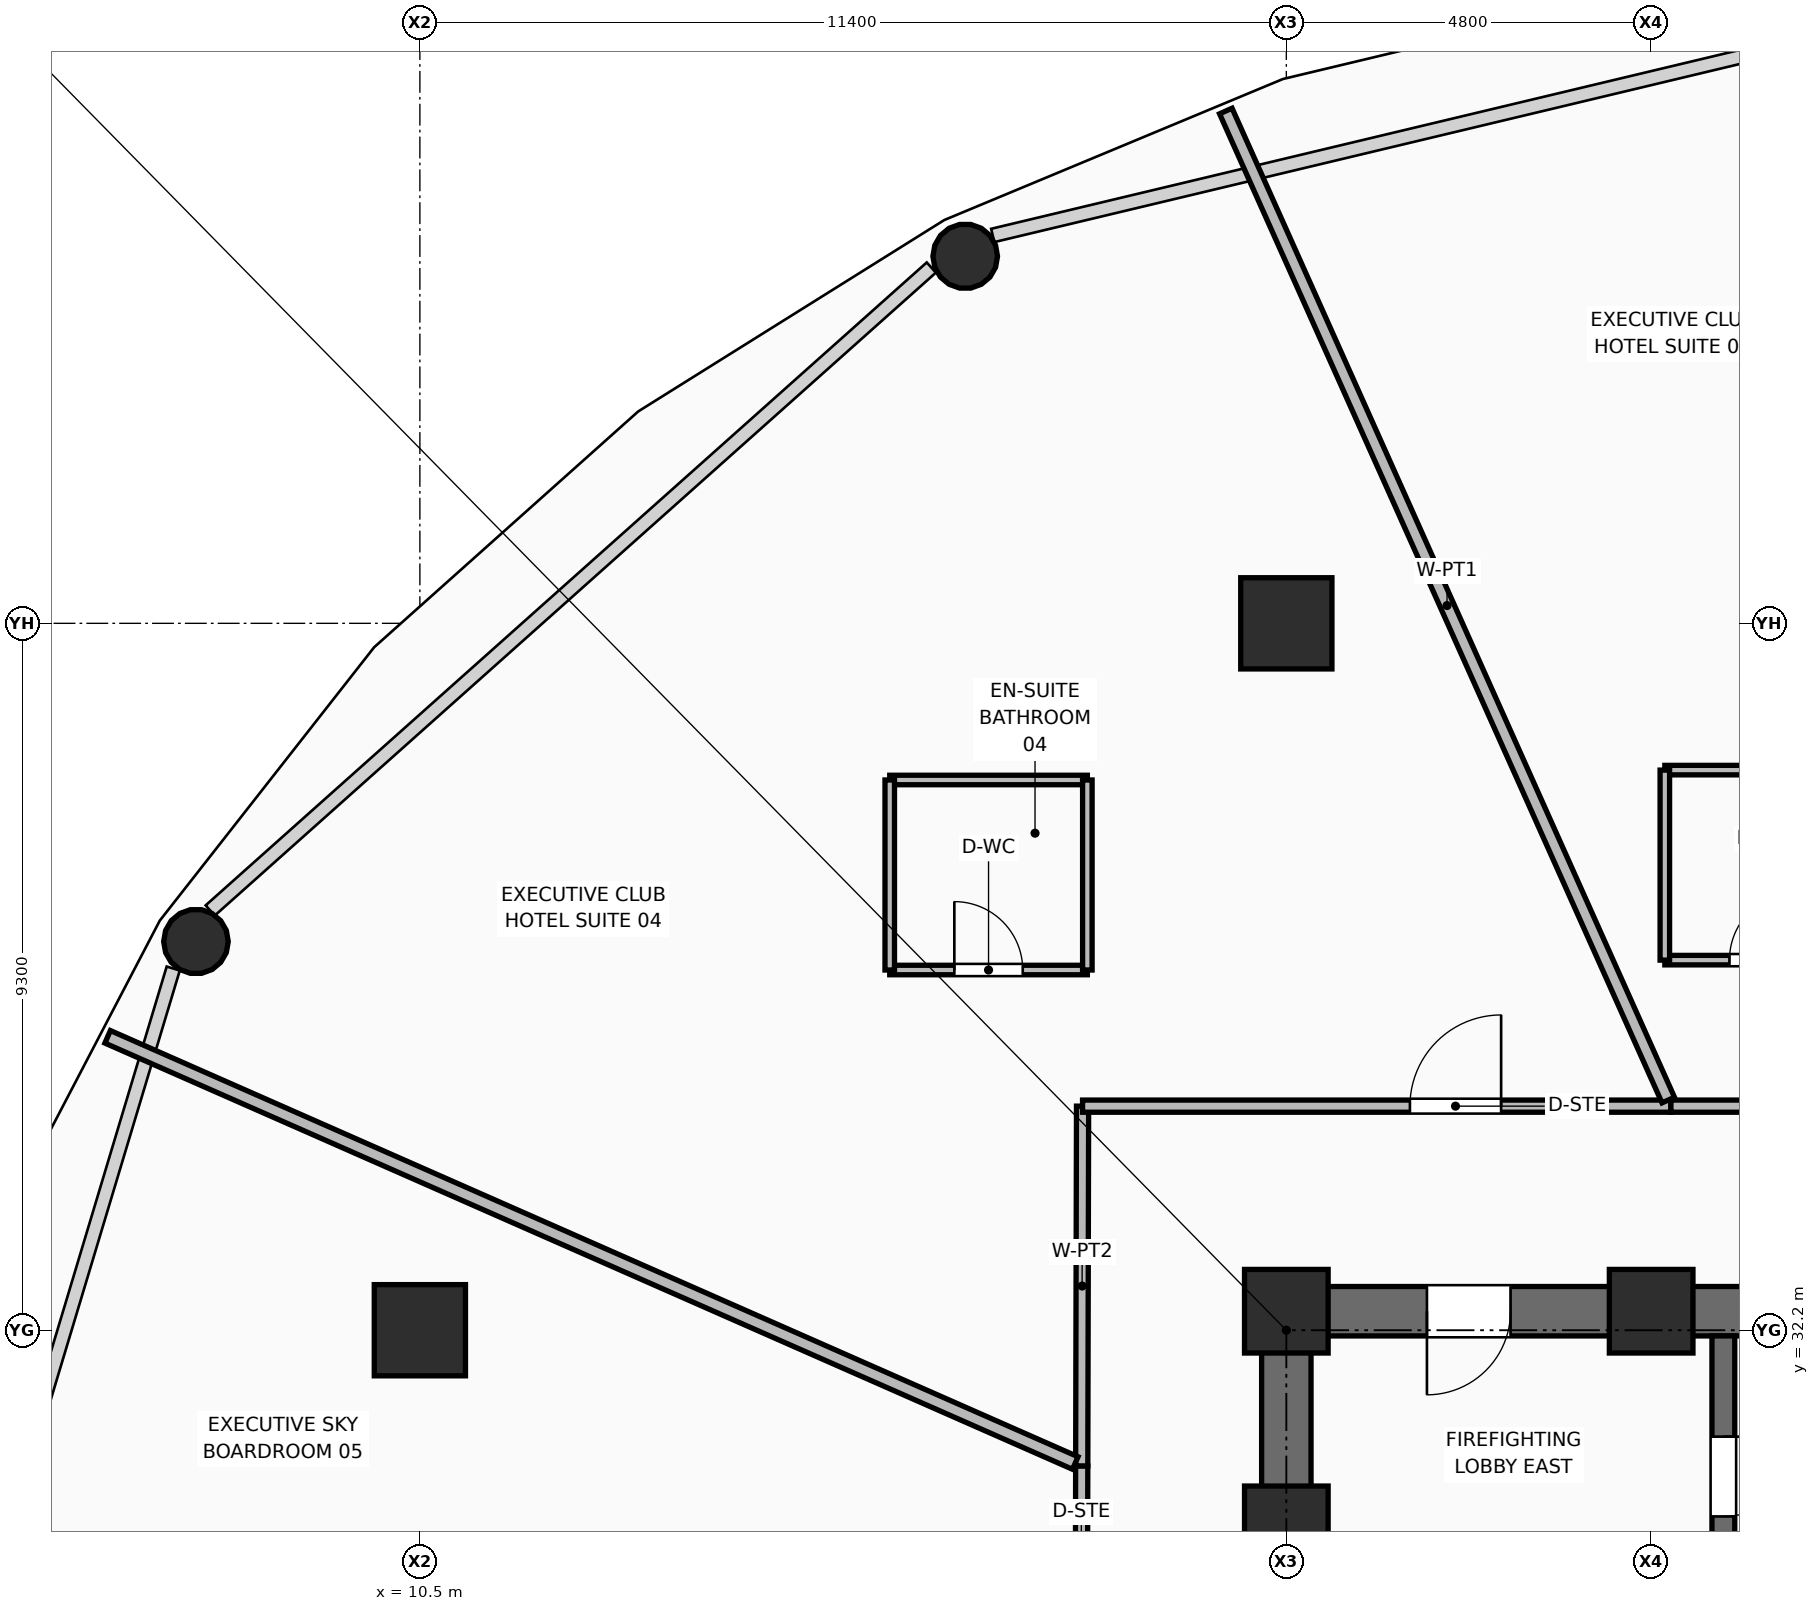
"""IFC4 building model, lengths in metres.
Left out: names, types, materials, properties, quantities, classifications, styles, units other than length and angle.
Written with IfcOpenShell. Run it as: python <this file> out.ifc"""

import sys

from ifc_helpers import new_model, si_unit, direction, frame, frame_2d, origin, origin_2d, place, context, subcontext, project, spatial, rectangle, hollow_rectangle, hollow_circle, extrude, element, fill, save


model = new_model("IFC4")
c1 = context("Model", 3, precision=1e-05, world=origin(), true_north=direction((0.0, 1.0)))
c2 = subcontext(c1, "Body", "Model", "MODEL_VIEW")
j1 = project(units=[si_unit("LENGTHUNIT", "METRE"), si_unit("PLANEANGLEUNIT", "RADIAN")], contexts=[c1])
p1 = place(None, origin())
s1 = spatial("IfcSite", under=j1, at=p1, CompositionType="ELEMENT")
p2 = place(p1, origin())
s2 = spatial("IfcBuilding", under=s1, at=p2, CompositionType="ELEMENT")
p3 = place(p2, frame((0.0, 0.0, 75.75)))
s3 = spatial("IfcBuildingStorey", under=s2, at=p3, CompositionType="ELEMENT", Elevation=75.75)
for number, where, z_axis, x_axis in (
    (1, (21.9, 29.6, 0.0), (0.0, 0.0, 1.0), (1.0, 0.0, 0.0)),
    (2, (21.9, 32.45, 0.0), (0.0, 0.0, 1.0), (1.0, 0.0, 0.0)),
    (3, (26.7, 32.45, 0.0), (0.0, 0.0, 1.0), (1.0, 0.0, 0.0)),
):
    element("IfcColumn", number, at=place(p3, frame(where, z_axis=z_axis, x_axis=x_axis)), inside=s3, PredefinedType="COLUMN", context=c2, shape_type="SweptSolid", body=[
        extrude(rectangle(XDim=1.1, YDim=1.1, at=origin_2d()), origin(), (0.0, 0.0, 1.0), 3.75),
    ])
for number, where, z_axis, x_axis in (
    (4, (10.5, 32.2, 0.0), (0.0, 0.0, 1.0), (1.0, 0.0, 0.0)),
    (5, (21.9, 41.5, 0.0), (0.0, 0.0, 1.0), (1.0, 0.0, 0.0)),
):
    element("IfcColumn", number, at=place(p3, frame(where, z_axis=z_axis, x_axis=x_axis)), inside=s3, PredefinedType="COLUMN", context=c2, shape_type="SweptSolid", body=[
        extrude(hollow_rectangle(XDim=1.2, YDim=1.2, WallThickness=0.045, at=origin_2d()), origin(), (0.0, 0.0, 1.0), 3.75),
    ])
p4 = place(p3, frame((17.675, 46.329, 0.0), z_axis=(0.020978592197, -0.032527068032, 0.999250663505), x_axis=(0.840374471714, 0.542006224404, 0.0)))
e6 = element("IfcColumn", 6, at=p4, inside=s3, PredefinedType="COLUMN", context=c2, shape_type="SweptSolid", body=[
    extrude(hollow_circle(Radius=0.425, WallThickness=0.04, at=origin_2d()), origin(), (0.0, 0.0, 1.0), 3.573),
])
p5 = place(p3, frame((7.554, 37.314, 0.0), z_axis=(0.03641885619, -0.018721888548, 0.999161227132), x_axis=(0.457197196227, 0.889365348865, 0.0)))
e7 = element("IfcColumn", 7, at=p5, inside=s3, PredefinedType="COLUMN", context=c2, shape_type="SweptSolid", body=[
    extrude(hollow_circle(Radius=0.425, WallThickness=0.04, at=origin_2d()), origin(), (0.0, 0.0, 1.0), 3.573),
])
p6 = place(p3, frame((21.575, 32.45, 0.0), z_axis=(0.0, 0.0, 1.0), x_axis=(1.0, 0.0, 0.0)))
e8 = element("IfcWall", 8, at=p6, inside=s3, PredefinedType="SHEAR", context=c2, shape_type="SweptSolid", body=[
    extrude(rectangle(XDim=19.85, YDim=0.65, at=frame_2d((9.925, 0.0))), origin(), (0.0, 0.0, 1.0), 3.57),
])
p7 = place(p6, frame((2.175, 0.0, 0.0)))
e9 = element("IfcOpeningElement", 9, at=p7, cuts=e8, PredefinedType="OPENING", context=c2, shape_type="SweptSolid", body=[
    extrude(rectangle(XDim=1.1, YDim=2.1, at=frame_2d((0.55, 1.05))), frame((0.0, 0.335, 0.0), z_axis=(0.0, -1.0, 0.0), x_axis=(1.0, 0.0, 0.0)), (0.0, 0.0, 1.0), 0.67),
])
p8 = place(p6, frame((15.565, 0.0, 0.0)))
e10 = element("IfcOpeningElement", 10, at=p8, cuts=e8, PredefinedType="OPENING", context=c2, shape_type="SweptSolid", body=[
    extrude(rectangle(XDim=1.0, YDim=2.1, at=frame_2d((0.5, 1.05))), frame((0.0, 0.335, 0.0), z_axis=(0.0, -1.0, 0.0), x_axis=(1.0, 0.0, 0.0)), (0.0, 0.0, 1.0), 0.67),
])
p9 = place(p6, frame((17.575, 0.0, 0.0)))
e11 = element("IfcOpeningElement", 11, at=p9, cuts=e8, PredefinedType="OPENING", context=c2, shape_type="SweptSolid", body=[
    extrude(rectangle(XDim=0.9, YDim=2.1, at=frame_2d((0.45, 1.05))), frame((0.0, 0.335, 0.0), z_axis=(0.0, -1.0, 0.0), x_axis=(1.0, 0.0, 0.0)), (0.0, 0.0, 1.0), 0.67),
])
p10 = place(p3, frame((21.9, 18.125, 0.0), z_axis=(0.0, 0.0, 1.0), x_axis=(0.0, 1.0, 0.0)))
e12 = element("IfcWall", 12, at=p10, inside=s3, PredefinedType="SHEAR", context=c2, shape_type="SweptSolid", body=[
    extrude(rectangle(XDim=14.0, YDim=0.65, at=frame_2d((7.0, 0.0))), origin(), (0.0, 0.0, 1.0), 3.57),
])
p11 = place(p3, frame((27.65, 28.75, 0.0), z_axis=(0.0, 0.0, 1.0), x_axis=(0.0, 1.0, 0.0)))
e13 = element("IfcWall", 13, at=p11, inside=s3, PredefinedType="SHEAR", context=c2, shape_type="SweptSolid", body=[
    extrude(rectangle(XDim=3.375, YDim=0.3, at=frame_2d((1.688, 0.0))), origin(), (0.0, 0.0, 1.0), 3.57),
])
p12 = place(p11, frame((1.0, 0.0, 0.0)))
e14 = element("IfcOpeningElement", 14, at=p12, cuts=e13, PredefinedType="OPENING", context=c2, shape_type="SweptSolid", body=[
    extrude(rectangle(XDim=1.05, YDim=2.1, at=frame_2d((0.525, 1.05))), frame((0.0, 0.16, 0.0), z_axis=(0.0, -1.0, 0.0), x_axis=(1.0, 0.0, 0.0)), (0.0, 0.0, 1.0), 0.32),
])
p13 = place(p3, frame((19.198, 26.142, 0.0), z_axis=(0.0, 0.0, 1.0), x_axis=(0.002342582991, 0.999997256149, 0.0)))
e15 = element("IfcWall", 15, at=p13, inside=s3, PredefinedType="PARTITIONING", context=c2, shape_type="SweptSolid", body=[
    extrude(rectangle(XDim=4.273, YDim=0.16, at=frame_2d((2.136, 0.0))), origin(), (0.0, 0.0, 1.0), 3.55),
])
p14 = place(p13, frame((1.464, 0.0, 0.0)))
e16 = element("IfcOpeningElement", 16, at=p14, cuts=e15, PredefinedType="OPENING", context=c2, shape_type="SweptSolid", body=[
    extrude(rectangle(XDim=1.2, YDim=2.1, at=frame_2d((0.6, 1.05))), frame((0.0, 0.09, 0.0), z_axis=(0.0, -1.0, 0.0), x_axis=(1.0, 0.0, 0.0)), (0.0, 0.0, 1.0), 0.18),
])
p15 = place(p3, frame((19.208, 30.415, 0.0), z_axis=(0.0, 0.0, 1.0), x_axis=(0.002321256513, 0.99999730588, 0.0)))
e17 = element("IfcWall", 17, at=p15, inside=s3, PredefinedType="PARTITIONING", context=c2, shape_type="SweptSolid", body=[
    extrude(rectangle(XDim=4.733, YDim=0.16, at=frame_2d((2.366, 0.0))), origin(), (0.0, 0.0, 1.0), 2.928),
])
p16 = place(p3, frame((19.219, 35.148, 0.0), z_axis=(0.0, 0.0, 1.0), x_axis=(1.0, 0.0, 0.0)))
e18 = element("IfcWall", 18, at=p16, inside=s3, PredefinedType="PARTITIONING", context=c2, shape_type="SweptSolid", body=[
    extrude(rectangle(XDim=7.741, YDim=0.16, at=frame_2d((3.871, 0.0))), origin(), (0.0, 0.0, 1.0), 2.928),
])
p17 = place(p16, frame((4.307, 0.0, 0.0)))
e19 = element("IfcOpeningElement", 19, at=p17, cuts=e18, PredefinedType="OPENING", context=c2, shape_type="SweptSolid", body=[
    extrude(rectangle(XDim=1.2, YDim=2.1, at=frame_2d((0.6, 1.05))), frame((0.0, 0.09, 0.0), z_axis=(0.0, -1.0, 0.0), x_axis=(1.0, 0.0, 0.0)), (0.0, 0.0, 1.0), 0.18),
])
p18 = place(p3, frame((26.96, 35.148, 0.0), z_axis=(0.0, 0.0, 1.0), x_axis=(1.0, 0.0, 0.0)))
e20 = element("IfcWall", 20, at=p18, inside=s3, PredefinedType="PARTITIONING", context=c2, shape_type="SweptSolid", body=[
    extrude(rectangle(XDim=4.344, YDim=0.16, at=frame_2d((2.172, 0.0))), origin(), (0.0, 0.0, 1.0), 2.928),
])
p19 = place(p18, frame((1.646, 0.0, 0.0)))
e21 = element("IfcOpeningElement", 21, at=p19, cuts=e20, PredefinedType="OPENING", context=c2, shape_type="SweptSolid", body=[
    extrude(rectangle(XDim=1.2, YDim=2.1, at=frame_2d((0.6, 1.05))), frame((0.0, 0.09, 0.0), z_axis=(0.0, -1.0, 0.0), x_axis=(1.0, 0.0, 0.0)), (0.0, 0.0, 1.0), 0.18),
])
p20 = place(p3, frame((26.925, 35.228, 0.0), z_axis=(0.0, 0.0, 1.0), x_axis=(-0.4083604268, 0.912820772016, 0.0)))
e22 = element("IfcWall", 22, at=p20, inside=s3, PredefinedType="PARTITIONING", context=c2, shape_type="SweptSolid", body=[
    extrude(rectangle(XDim=14.255, YDim=0.18, at=frame_2d((7.127, 0.0))), origin(), (0.0, 0.0, 1.0), 2.775),
])
p21 = place(p3, frame((19.123, 30.453, 0.0), z_axis=(0.0, 0.0, 1.0), x_axis=(-0.915167724462, 0.403073239131, 0.0)))
e23 = element("IfcWall", 23, at=p21, inside=s3, PredefinedType="PARTITIONING", context=c2, shape_type="SweptSolid", body=[
    extrude(rectangle(XDim=13.911, YDim=0.18, at=frame_2d((6.956, 0.0))), origin(), (0.0, 0.0, 1.0), 2.775),
])
p22 = place(p3, frame((26.88, 37.069, 0.0), z_axis=(0.0, 0.0, 1.0), x_axis=(1.0, 0.0, 0.0)))
e24 = element("IfcWall", 24, at=p22, inside=s3, PredefinedType="PARTITIONING", context=c2, shape_type="SweptSolid", body=[
    extrude(rectangle(XDim=2.6, YDim=0.125, at=frame_2d((1.3, 0.0))), origin(), (0.0, 0.0, 1.0), 3.55),
])
p23 = place(p22, frame((0.85, 0.0, 0.0)))
e25 = element("IfcOpeningElement", 25, at=p23, cuts=e24, PredefinedType="OPENING", context=c2, shape_type="SweptSolid", body=[
    extrude(rectangle(XDim=0.9, YDim=2.1, at=frame_2d((0.45, 1.05))), frame((0.0, 0.073, 0.0), z_axis=(0.0, -1.0, 0.0), x_axis=(1.0, 0.0, 0.0)), (0.0, 0.0, 1.0), 0.145),
])
p24 = place(p3, frame((26.88, 39.569, 0.0), z_axis=(0.0, 0.0, 1.0), x_axis=(1.0, 0.0, 0.0)))
e26 = element("IfcWall", 26, at=p24, inside=s3, PredefinedType="PARTITIONING", context=c2, shape_type="SweptSolid", body=[
    extrude(rectangle(XDim=2.6, YDim=0.125, at=frame_2d((1.3, 0.0))), origin(), (0.0, 0.0, 1.0), 3.55),
])
p25 = place(p3, frame((26.88, 37.069, 0.0), z_axis=(0.0, 0.0, 1.0), x_axis=(0.0, 1.0, 0.0)))
e27 = element("IfcWall", 27, at=p25, inside=s3, PredefinedType="PARTITIONING", context=c2, shape_type="SweptSolid", body=[
    extrude(rectangle(XDim=2.5, YDim=0.125, at=frame_2d((1.25, 0.0))), origin(), (0.0, 0.0, 1.0), 3.55),
])
p26 = place(p3, frame((16.682, 36.939, 0.0), z_axis=(0.0, 0.0, 1.0), x_axis=(1.0, 0.0, 0.0)))
e28 = element("IfcWall", 28, at=p26, inside=s3, PredefinedType="PARTITIONING", context=c2, shape_type="SweptSolid", body=[
    extrude(rectangle(XDim=2.6, YDim=0.125, at=frame_2d((1.3, 0.0))), origin(), (0.0, 0.0, 1.0), 3.55),
])
p27 = place(p26, frame((0.85, 0.0, 0.0)))
e29 = element("IfcOpeningElement", 29, at=p27, cuts=e28, PredefinedType="OPENING", context=c2, shape_type="SweptSolid", body=[
    extrude(rectangle(XDim=0.9, YDim=2.1, at=frame_2d((0.45, 1.05))), frame((0.0, 0.073, 0.0), z_axis=(0.0, -1.0, 0.0), x_axis=(1.0, 0.0, 0.0)), (0.0, 0.0, 1.0), 0.145),
])
p28 = place(p3, frame((16.682, 39.439, 0.0), z_axis=(0.0, 0.0, 1.0), x_axis=(1.0, 0.0, 0.0)))
e30 = element("IfcWall", 30, at=p28, inside=s3, PredefinedType="PARTITIONING", context=c2, shape_type="SweptSolid", body=[
    extrude(rectangle(XDim=2.6, YDim=0.125, at=frame_2d((1.3, 0.0))), origin(), (0.0, 0.0, 1.0), 3.55),
])
for number, where, z_axis, x_axis in (
    (31, (16.682, 36.939, 0.0), (0.0, 0.0, 1.0), (0.0, 1.0, 0.0)),
    (32, (19.282, 36.939, 0.0), (0.0, 0.0, 1.0), (0.0, 1.0, 0.0)),
):
    element("IfcWall", number, at=place(p3, frame(where, z_axis=z_axis, x_axis=x_axis)), inside=s3, PredefinedType="PARTITIONING", context=c2, shape_type="SweptSolid", body=[
        extrude(rectangle(XDim=2.5, YDim=0.125, at=frame_2d((1.25, 0.0))), origin(), (0.0, 0.0, 1.0), 3.55),
    ])
p29 = place(p12, frame((1.05, 0.0, 0.0), z_axis=(0.0, 0.0, 1.0), x_axis=(-1.0, 0.0, 0.0)))
e33 = element("IfcDoor", 33, at=p29, inside=s3, OperationType="SINGLE_SWING_LEFT", PredefinedType="DOOR", context=c2, shape_type="SweptSolid", body=[
    extrude(rectangle(XDim=1.05, YDim=2.1, at=frame_2d((0.525, 1.05))), frame((0.0, 0.025, 0.0), z_axis=(0.0, -1.0, 0.0), x_axis=(1.0, 0.0, 0.0)), (0.0, 0.0, 1.0), 0.05),
])
fill(e14, e33)
p30 = place(p7, frame((1.1, 0.0, 0.0), z_axis=(0.0, 0.0, 1.0), x_axis=(-1.0, 0.0, 0.0)))
e34 = element("IfcDoor", 34, at=p30, inside=s3, OperationType="SINGLE_SWING_RIGHT", PredefinedType="DOOR", context=c2, shape_type="SweptSolid", body=[
    extrude(rectangle(XDim=1.1, YDim=2.1, at=frame_2d((0.55, 1.05))), frame((0.0, 0.025, 0.0), z_axis=(0.0, -1.0, 0.0), x_axis=(1.0, 0.0, 0.0)), (0.0, 0.0, 1.0), 0.05),
])
fill(e9, e34)
p31 = place(p23, origin())
e35 = element("IfcDoor", 35, at=p31, inside=s3, OperationType="SINGLE_SWING_RIGHT", PredefinedType="DOOR", context=c2, shape_type="SweptSolid", body=[
    extrude(rectangle(XDim=0.9, YDim=2.1, at=frame_2d((0.45, 1.05))), frame((0.0, 0.025, 0.0), z_axis=(0.0, -1.0, 0.0), x_axis=(1.0, 0.0, 0.0)), (0.0, 0.0, 1.0), 0.05),
])
fill(e25, e35)
p32 = place(p27, origin())
e36 = element("IfcDoor", 36, at=p32, inside=s3, OperationType="SINGLE_SWING_LEFT", PredefinedType="DOOR", context=c2, shape_type="SweptSolid", body=[
    extrude(rectangle(XDim=0.9, YDim=2.1, at=frame_2d((0.45, 1.05))), frame((0.0, 0.025, 0.0), z_axis=(0.0, -1.0, 0.0), x_axis=(1.0, 0.0, 0.0)), (0.0, 0.0, 1.0), 0.05),
])
fill(e29, e36)
p33 = place(p17, origin())
e37 = element("IfcDoor", 37, at=p33, inside=s3, OperationType="SINGLE_SWING_RIGHT", PredefinedType="DOOR", context=c2, shape_type="SweptSolid", body=[
    extrude(rectangle(XDim=1.2, YDim=2.1, at=frame_2d((0.6, 1.05))), frame((0.0, 0.025, 0.0), z_axis=(0.0, -1.0, 0.0), x_axis=(1.0, 0.0, 0.0)), (0.0, 0.0, 1.0), 0.05),
])
fill(e19, e37)
save(model, sys.argv[1])
